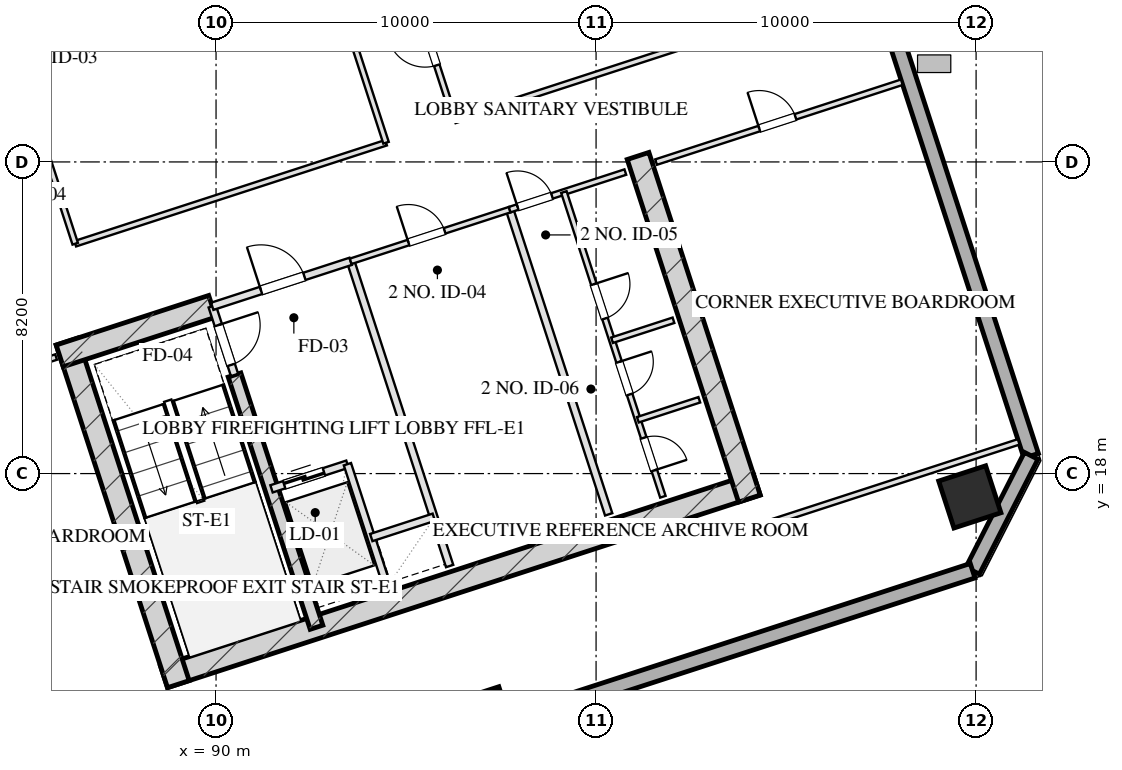
"""IFC4 building model, lengths in metres.
Left out: names, types, materials, properties, quantities, classifications, styles, units other than length and angle.
Written with IfcOpenShell. Run it as: python <this file> out.ifc"""

import sys

from ifc_helpers import new_model, si_unit, direction, frame, frame_2d, origin, origin_2d, place, context, subcontext, project, spatial, rectangle, hollow_rectangle, extrude, element, fill, save


model = new_model("IFC4")
c1 = context("Model", 3, precision=1e-05, world=origin(), true_north=direction((0.0, 1.0)))
c2 = subcontext(c1, "Body", "Model", "MODEL_VIEW")
j1 = project(units=[si_unit("LENGTHUNIT", "METRE"), si_unit("PLANEANGLEUNIT", "RADIAN")], contexts=[c1])
p1 = place(None, origin())
s1 = spatial("IfcSite", under=j1, at=p1, CompositionType="ELEMENT")
p2 = place(p1, origin())
s2 = spatial("IfcBuilding", under=s1, at=p2, CompositionType="ELEMENT")
p3 = place(p2, frame((0.0, 0.0, 163.3)))
s3 = spatial("IfcBuildingStorey", under=s2, at=p3, CompositionType="ELEMENT", Elevation=163.3)
p4 = place(p3, frame((88.63, 12.652, 0.0), z_axis=(0.0, 0.0, 1.0), x_axis=(0.95105714907, 0.309015046886, 0.0)))
e1 = element("IfcWall", 1, at=p4, inside=s3, PredefinedType="SHEAR", context=c2, shape_type="SweptSolid", body=[
    extrude(rectangle(XDim=16.4, YDim=0.6, at=frame_2d((8.2, 0.0))), origin(), (0.0, 0.0, 1.0), 3.45),
])
p5 = place(p3, frame((86.078, 21.475, 0.0), z_axis=(0.0, 0.0, 1.0), x_axis=(0.309017938678, -0.951056209472, 0.0)))
e2 = element("IfcWall", 2, at=p5, inside=s3, PredefinedType="SHEAR", context=c2, shape_type="SweptSolid", body=[
    extrude(rectangle(XDim=9.48, YDim=0.6, at=frame_2d((4.74, 0.0))), origin(), (0.0, 0.0, 1.0), 3.45),
])
p6 = place(p3, frame((101.105, 26.358, 0.0), z_axis=(0.0, 0.0, 1.0), x_axis=(0.309010370028, -0.95105866865, 0.0)))
e3 = element("IfcWall", 3, at=p6, inside=s3, PredefinedType="SHEAR", context=c2, shape_type="SweptSolid", body=[
    extrude(rectangle(XDim=9.48, YDim=0.6, at=frame_2d((4.74, 0.0))), origin(), (0.0, 0.0, 1.0), 3.45),
])
p7 = place(p3, frame((90.486, 20.594, 0.0), z_axis=(0.0, 0.0, 1.0), x_axis=(0.309020428229, -0.951055400562, 0.0)))
e4 = element("IfcWall", 4, at=p7, inside=s3, PredefinedType="SHEAR", context=c2, shape_type="SweptSolid", body=[
    extrude(rectangle(XDim=6.98, YDim=0.35, at=frame_2d((3.49, 0.0))), origin(), (0.0, 0.0, 1.0), 3.45),
])
p8 = place(p3, frame((85.886, 21.097, 0.0), z_axis=(0.0, 0.0, 1.0), x_axis=(0.951068073652, 0.308981422225, 0.0)))
e5 = element("IfcWall", 5, at=p8, inside=s3, PredefinedType="SHEAR", context=c2, shape_type="SweptSolid", body=[
    extrude(rectangle(XDim=4.22, YDim=0.6, at=frame_2d((2.11, 0.0))), origin(), (0.0, 0.0, 1.0), 3.45),
])
p9 = place(p3, frame((109.835, 17.386, 0.0), z_axis=(0.0, 0.0, 1.0), x_axis=(0.951056516295, 0.309016994375, 0.0)))
e6 = element("IfcColumn", 6, at=p9, inside=s3, PredefinedType="COLUMN", context=c2, shape_type="SweptSolid", body=[
    extrude(hollow_rectangle(XDim=1.3, YDim=1.3, WallThickness=0.045, at=origin_2d()), origin(), (0.0, 0.0, 1.0), 3.451),
])
p10 = place(p3, frame((97.185, 11.888, 0.0), z_axis=(0.0, 0.0, 1.0), x_axis=(0.951056516295, 0.309016994375, 0.0)))
e7 = element("IfcColumn", 7, at=p10, inside=s3, PredefinedType="COLUMN", context=c2, shape_type="SweptSolid", body=[
    extrude(hollow_rectangle(XDim=0.8, YDim=0.8, WallThickness=0.028, at=origin_2d()), origin(), (0.0, 0.0, 1.0), 3.451),
])
p11 = place(p3, frame((98.224, 59.173, 0.0), z_axis=(0.0, 0.0, 1.0), x_axis=(0.309014228706, -0.951057414911, 0.0)))
e8 = element("IfcWall", 8, at=p11, inside=s3, PredefinedType="SOLIDWALL", context=c2, shape_type="SweptSolid", body=[
    extrude(rectangle(XDim=42.8, YDim=0.4, at=frame_2d((21.4, 0.0))), origin(), (0.0, 0.0, 1.0), 2.61),
])
p12 = place(p11, frame((26.675, 0.0, 0.75)))
e9 = element("IfcOpeningElement", 9, at=p12, cuts=e8, PredefinedType="OPENING", context=c2, shape_type="SweptSolid", body=[
    extrude(rectangle(XDim=2.25, YDim=1.46, at=frame_2d((1.125, 0.73))), frame((0.0, 0.21, 0.0), z_axis=(0.0, -1.0, 0.0), x_axis=(1.0, 0.0, 0.0)), (0.0, 0.0, 1.0), 0.42),
])
p13 = place(p11, frame((22.875, 0.0, 0.75)))
e10 = element("IfcOpeningElement", 10, at=p13, cuts=e8, PredefinedType="OPENING", context=c2, shape_type="SweptSolid", body=[
    extrude(rectangle(XDim=2.25, YDim=1.46, at=frame_2d((1.125, 0.73))), frame((0.0, 0.21, 0.0), z_axis=(0.0, -1.0, 0.0), x_axis=(1.0, 0.0, 0.0)), (0.0, 0.0, 1.0), 0.42),
])
p14 = place(p11, frame((17.892, 0.0, 0.0)))
e11 = element("IfcOpeningElement", 11, at=p14, cuts=e8, PredefinedType="OPENING", context=c2, shape_type="SweptSolid", body=[
    extrude(rectangle(XDim=1.1, YDim=2.15, at=frame_2d((0.55, 1.075))), frame((0.0, 0.21, 0.0), z_axis=(0.0, -1.0, 0.0), x_axis=(1.0, 0.0, 0.0)), (0.0, 0.0, 1.0), 0.42),
])
p15 = place(p3, frame((111.449, 18.468, 0.0), z_axis=(0.0, 0.0, 1.0), x_axis=(-0.454019523198, -0.890991735402, 0.0)))
e12 = element("IfcWall", 12, at=p15, inside=s3, PredefinedType="SOLIDWALL", context=c2, shape_type="SweptSolid", body=[
    extrude(rectangle(XDim=3.394, YDim=0.4, at=frame_2d((1.697, 0.0))), origin(), (0.0, 0.0, 1.0), 2.61),
])
p16 = place(p3, frame((109.908, 15.444, 0.0), z_axis=(0.0, 0.0, 1.0), x_axis=(-0.951057580055, -0.30901372044, 0.0)))
e13 = element("IfcWall", 13, at=p16, inside=s3, PredefinedType="SOLIDWALL", context=c2, shape_type="SweptSolid", body=[
    extrude(rectangle(XDim=26.4, YDim=0.4, at=frame_2d((13.2, 0.0))), origin(), (0.0, 0.0, 1.0), 2.61),
])
p17 = place(p3, frame((89.899, 22.401, 0.0), z_axis=(0.0, 0.0, 1.0), x_axis=(0.308932062672, -0.951084108086, 0.0)))
e14 = element("IfcWall", 14, at=p17, inside=s3, PredefinedType="PARTITIONING", context=c2, shape_type="SweptSolid", body=[
    extrude(rectangle(XDim=1.9, YDim=0.2, at=frame_2d((0.95, 0.0))), origin(), (0.0, 0.0, 1.0), 3.175),
])
p18 = place(p17, frame((0.52, 0.0, 0.0)))
e15 = element("IfcOpeningElement", 15, at=p18, cuts=e14, PredefinedType="OPENING", context=c2, shape_type="SweptSolid", body=[
    extrude(rectangle(XDim=1.1, YDim=2.05, at=frame_2d((0.55, 1.025))), frame((0.0, 0.11, 0.0), z_axis=(0.0, -1.0, 0.0), x_axis=(1.0, 0.0, 0.0)), (0.0, 0.0, 1.0), 0.22),
])
p19 = place(p3, frame((93.542, 23.585, 0.0), z_axis=(0.0, 0.0, 1.0), x_axis=(0.309042196757, -0.951048327176, 0.0)))
e16 = element("IfcWall", 16, at=p19, inside=s3, PredefinedType="PARTITIONING", context=c2, shape_type="SweptSolid", body=[
    extrude(rectangle(XDim=8.43, YDim=0.2, at=frame_2d((4.215, 0.0))), origin(), (0.0, 0.0, 1.0), 3.175),
])
p20 = place(p3, frame((89.899, 22.401, 0.0), z_axis=(0.0, 0.0, 1.0), x_axis=(0.951046716504, 0.309047153403, 0.0)))
e17 = element("IfcWall", 17, at=p20, inside=s3, PredefinedType="PARTITIONING", context=c2, shape_type="SweptSolid", body=[
    extrude(rectangle(XDim=3.83, YDim=0.2, at=frame_2d((1.915, 0.0))), origin(), (0.0, 0.0, 1.0), 3.175),
])
p21 = place(p20, frame((1.35, 0.0, 0.0)))
e18 = element("IfcOpeningElement", 18, at=p21, cuts=e17, PredefinedType="OPENING", context=c2, shape_type="SweptSolid", body=[
    extrude(rectangle(XDim=1.2, YDim=2.05, at=frame_2d((0.6, 1.025))), frame((0.0, 0.11, 0.0), z_axis=(0.0, -1.0, 0.0), x_axis=(1.0, 0.0, 0.0)), (0.0, 0.0, 1.0), 0.22),
])
p22 = place(p3, frame((91.46, 17.598, 0.0), z_axis=(0.0, 0.0, 1.0), x_axis=(0.951062257173, 0.308999325213, 0.0)))
e19 = element("IfcWall", 19, at=p22, inside=s3, PredefinedType="PARTITIONING", context=c2, shape_type="SweptSolid", body=[
    extrude(rectangle(XDim=2.1, YDim=0.2, at=frame_2d((1.05, 0.0))), origin(), (0.0, 0.0, 1.0), 3.175),
])
p23 = place(p22, frame((0.35, 0.0, 0.0)))
e20 = element("IfcOpeningElement", 20, at=p23, cuts=e19, PredefinedType="OPENING", context=c2, shape_type="SweptSolid", body=[
    extrude(rectangle(XDim=1.1, YDim=2.05, at=frame_2d((0.55, 1.025))), frame((0.0, 0.11, 0.0), z_axis=(0.0, -1.0, 0.0), x_axis=(1.0, 0.0, 0.0)), (0.0, 0.0, 1.0), 0.22),
])
p24 = place(p3, frame((93.457, 18.247, 0.0), z_axis=(0.0, 0.0, 1.0), x_axis=(0.3089935693, -0.951064127245, 0.0)))
e21 = element("IfcWall", 21, at=p24, inside=s3, PredefinedType="PARTITIONING", context=c2, shape_type="SweptSolid", body=[
    extrude(rectangle(XDim=3.7, YDim=0.2, at=frame_2d((1.85, 0.0))), origin(), (0.0, 0.0, 1.0), 3.175),
])
p25 = place(p3, frame((94.084, 16.317, 0.0), z_axis=(0.0, 0.0, 1.0), x_axis=(0.951041328149, 0.309063734775, 0.0)))
e22 = element("IfcWall", 22, at=p25, inside=s3, PredefinedType="PARTITIONING", context=c2, shape_type="SweptSolid", body=[
    extrude(rectangle(XDim=1.73, YDim=0.2, at=frame_2d((0.865, 0.0))), origin(), (0.0, 0.0, 1.0), 3.175),
])
p26 = place(p3, frame((97.727, 24.944, 0.0), z_axis=(0.0, 0.0, 1.0), x_axis=(0.309016001439, -0.951056838919, 0.0)))
e23 = element("IfcWall", 23, at=p26, inside=s3, PredefinedType="PARTITIONING", context=c2, shape_type="SweptSolid", body=[
    extrude(rectangle(XDim=8.43, YDim=0.2, at=frame_2d((4.215, 0.0))), origin(), (0.0, 0.0, 1.0), 3.175),
])
p27 = place(p3, frame((93.542, 23.585, 0.0), z_axis=(0.0, 0.0, 1.0), x_axis=(0.951063829732, 0.308994485023, 0.0)))
e24 = element("IfcWall", 24, at=p27, inside=s3, PredefinedType="PARTITIONING", context=c2, shape_type="SweptSolid", body=[
    extrude(rectangle(XDim=4.4, YDim=0.15, at=frame_2d((2.2, 0.0))), origin(), (0.0, 0.0, 1.0), 3.175),
])
p28 = place(p27, frame((1.6, 0.0, 0.0)))
e25 = element("IfcOpeningElement", 25, at=p28, cuts=e24, PredefinedType="OPENING", context=c2, shape_type="SweptSolid", body=[
    extrude(rectangle(XDim=1.0, YDim=2.05, at=frame_2d((0.5, 1.025))), frame((0.0, 0.085, 0.0), z_axis=(0.0, -1.0, 0.0), x_axis=(1.0, 0.0, 0.0)), (0.0, 0.0, 1.0), 0.17),
])
p29 = place(p3, frame((97.727, 24.944, 0.0), z_axis=(0.0, 0.0, 1.0), x_axis=(0.951036872128, 0.309077446369, 0.0)))
e26 = element("IfcWall", 26, at=p29, inside=s3, PredefinedType="PARTITIONING", context=c2, shape_type="SweptSolid", body=[
    extrude(rectangle(XDim=3.2, YDim=0.15, at=frame_2d((1.6, 0.0))), origin(), (0.0, 0.0, 1.0), 3.175),
])
p30 = place(p29, frame((0.22, 0.0, 0.0)))
e27 = element("IfcOpeningElement", 27, at=p30, cuts=e26, PredefinedType="OPENING", context=c2, shape_type="SweptSolid", body=[
    extrude(rectangle(XDim=0.95, YDim=2.05, at=frame_2d((0.475, 1.025))), frame((0.0, 0.085, 0.0), z_axis=(0.0, -1.0, 0.0), x_axis=(1.0, 0.0, 0.0)), (0.0, 0.0, 1.0), 0.17),
])
p31 = place(p3, frame((99.153, 25.408, 0.0), z_axis=(0.0, 0.0, 1.0), x_axis=(0.309016001439, -0.951056838919, 0.0)))
e28 = element("IfcWall", 28, at=p31, inside=s3, PredefinedType="PARTITIONING", context=c2, shape_type="SweptSolid", body=[
    extrude(rectangle(XDim=8.43, YDim=0.15, at=frame_2d((4.215, 0.0))), origin(), (0.0, 0.0, 1.0), 3.175),
])
p32 = place(p31, frame((2.55, 0.0, 0.0)))
e29 = element("IfcOpeningElement", 29, at=p32, cuts=e28, PredefinedType="OPENING", context=c2, shape_type="SweptSolid", body=[
    extrude(rectangle(XDim=0.95, YDim=2.05, at=frame_2d((0.475, 1.025))), frame((0.0, 0.085, 0.0), z_axis=(0.0, -1.0, 0.0), x_axis=(1.0, 0.0, 0.0)), (0.0, 0.0, 1.0), 0.17),
])
p33 = place(p31, frame((4.7, 0.0, 0.0)))
e30 = element("IfcOpeningElement", 30, at=p33, cuts=e28, PredefinedType="OPENING", context=c2, shape_type="SweptSolid", body=[
    extrude(rectangle(XDim=0.9, YDim=2.05, at=frame_2d((0.45, 1.025))), frame((0.0, 0.085, 0.0), z_axis=(0.0, -1.0, 0.0), x_axis=(1.0, 0.0, 0.0)), (0.0, 0.0, 1.0), 0.17),
])
p34 = place(p31, frame((6.8, 0.0, 0.0)))
e31 = element("IfcOpeningElement", 31, at=p34, cuts=e28, PredefinedType="OPENING", context=c2, shape_type="SweptSolid", body=[
    extrude(rectangle(XDim=0.9, YDim=2.05, at=frame_2d((0.45, 1.025))), frame((0.0, 0.085, 0.0), z_axis=(0.0, -1.0, 0.0), x_axis=(1.0, 0.0, 0.0)), (0.0, 0.0, 1.0), 0.17),
])
p35 = place(p3, frame((100.42, 21.509, 0.0), z_axis=(0.0, 0.0, 1.0), x_axis=(0.951040401051, 0.309066587596, 0.0)))
e32 = element("IfcWall", 32, at=p35, inside=s3, PredefinedType="PARTITIONING", context=c2, shape_type="SweptSolid", body=[
    extrude(rectangle(XDim=1.7, YDim=0.15, at=frame_2d((0.85, 0.0))), origin(), (0.0, 0.0, 1.0), 3.175),
])
p36 = place(p3, frame((101.1, 19.416, 0.0), z_axis=(0.0, 0.0, 1.0), x_axis=(0.951054116971, 0.309024378638, 0.0)))
e33 = element("IfcWall", 33, at=p36, inside=s3, PredefinedType="PARTITIONING", context=c2, shape_type="SweptSolid", body=[
    extrude(rectangle(XDim=1.7, YDim=0.15, at=frame_2d((0.85, 0.0))), origin(), (0.0, 0.0, 1.0), 3.175),
])
p37 = place(p3, frame((78.753, 18.78, 0.0), z_axis=(0.0, 0.0, 1.0), x_axis=(0.951060977215, 0.309003264738, 0.0)))
e34 = element("IfcWall", 34, at=p37, inside=s3, PredefinedType="PARTITIONING", context=c2, shape_type="SweptSolid", body=[
    extrude(rectangle(XDim=7.4, YDim=0.15, at=frame_2d((3.7, 0.0))), origin(), (0.0, 0.0, 1.0), 3.175),
])
p38 = place(p37, frame((3.108, 0.0, 0.0)))
e35 = element("IfcOpeningElement", 35, at=p38, cuts=e34, PredefinedType="OPENING", context=c2, shape_type="SweptSolid", body=[
    extrude(rectangle(XDim=1.05, YDim=2.05, at=frame_2d((0.525, 1.025))), frame((0.0, 0.085, 0.0), z_axis=(0.0, -1.0, 0.0), x_axis=(1.0, 0.0, 0.0)), (0.0, 0.0, 1.0), 0.17),
])
p39 = place(p3, frame((104.653, 16.733, 0.0), z_axis=(0.0, 0.0, 1.0), x_axis=(0.951054383043, 0.309023559774, 0.0)))
e36 = element("IfcWall", 36, at=p39, inside=s3, PredefinedType="PARTITIONING", context=c2, shape_type="SweptSolid", body=[
    extrude(rectangle(XDim=6.8, YDim=0.15, at=frame_2d((3.4, 0.0))), origin(), (0.0, 0.0, 1.0), 3.175),
])
p40 = place(p3, frame((101.578, 26.196, 0.0), z_axis=(0.0, 0.0, 1.0), x_axis=(0.951064934653, 0.308991084134, 0.0)))
e37 = element("IfcWall", 37, at=p40, inside=s3, PredefinedType="PARTITIONING", context=c2, shape_type="SweptSolid", body=[
    extrude(rectangle(XDim=6.8, YDim=0.15, at=frame_2d((3.4, 0.0))), origin(), (0.0, 0.0, 1.0), 3.175),
])
p41 = place(p40, frame((2.856, 0.0, 0.0)))
e38 = element("IfcOpeningElement", 38, at=p41, cuts=e37, PredefinedType="OPENING", context=c2, shape_type="SweptSolid", body=[
    extrude(rectangle(XDim=1.0, YDim=2.05, at=frame_2d((0.5, 1.025))), frame((0.0, 0.085, 0.0), z_axis=(0.0, -1.0, 0.0), x_axis=(1.0, 0.0, 0.0)), (0.0, 0.0, 1.0), 0.17),
])
p42 = place(p3, frame((86.294, 24.048, 0.0), z_axis=(0.0, 0.0, 1.0), x_axis=(0.951052008164, 0.309030868631, 0.0)))
e39 = element("IfcWall", 39, at=p42, inside=s3, PredefinedType="PARTITIONING", context=c2, shape_type="SweptSolid", body=[
    extrude(rectangle(XDim=8.6, YDim=0.15, at=frame_2d((4.3, 0.0))), origin(), (0.0, 0.0, 1.0), 3.175),
])
p43 = place(p3, frame((96.28, 27.292, 0.0), z_axis=(0.0, 0.0, 1.0), x_axis=(0.951056999652, 0.309015506751, 0.0)))
e40 = element("IfcWall", 40, at=p43, inside=s3, PredefinedType="PARTITIONING", context=c2, shape_type="SweptSolid", body=[
    extrude(rectangle(XDim=11.5, YDim=0.15, at=frame_2d((5.75, 0.0))), origin(), (0.0, 0.0, 1.0), 3.175),
])
p44 = place(p3, frame((86.294, 24.048, 0.0), z_axis=(0.0, 0.0, 1.0), x_axis=(-0.309004459387, 0.951060589068, 0.0)))
e41 = element("IfcWall", 41, at=p44, inside=s3, PredefinedType="PARTITIONING", context=c2, shape_type="SweptSolid", body=[
    extrude(rectangle(XDim=16.64, YDim=0.15, at=frame_2d((8.32, 0.0))), origin(), (0.0, 0.0, 1.0), 3.175),
])
p45 = place(p44, frame((4.284, 0.0, 0.0)))
e42 = element("IfcOpeningElement", 42, at=p45, cuts=e41, PredefinedType="OPENING", context=c2, shape_type="SweptSolid", body=[
    extrude(rectangle(XDim=1.1, YDim=2.05, at=frame_2d((0.55, 1.025))), frame((0.0, 0.085, 0.0), z_axis=(0.0, -1.0, 0.0), x_axis=(1.0, 0.0, 0.0)), (0.0, 0.0, 1.0), 0.17),
])
p46 = place(p44, frame((12.724, 0.0, 0.0)))
e43 = element("IfcOpeningElement", 43, at=p46, cuts=e41, PredefinedType="OPENING", context=c2, shape_type="SweptSolid", body=[
    extrude(rectangle(XDim=1.1, YDim=2.05, at=frame_2d((0.55, 1.025))), frame((0.0, 0.085, 0.0), z_axis=(0.0, -1.0, 0.0), x_axis=(1.0, 0.0, 0.0)), (0.0, 0.0, 1.0), 0.17),
])
p47 = place(p3, frame((94.473, 26.705, 0.0), z_axis=(0.0, 0.0, 1.0), x_axis=(-0.309022042254, 0.951054876125, 0.0)))
e44 = element("IfcWall", 44, at=p47, inside=s3, PredefinedType="PARTITIONING", context=c2, shape_type="SweptSolid", body=[
    extrude(rectangle(XDim=16.64, YDim=0.15, at=frame_2d((8.32, 0.0))), origin(), (0.0, 0.0, 1.0), 3.175),
])
p48 = place(p3, frame((96.28, 27.292, 0.0), z_axis=(0.0, 0.0, 1.0), x_axis=(-0.309008771245, 0.951059188113, 0.0)))
e45 = element("IfcWall", 45, at=p48, inside=s3, PredefinedType="PARTITIONING", context=c2, shape_type="SweptSolid", body=[
    extrude(rectangle(XDim=16.64, YDim=0.15, at=frame_2d((8.32, 0.0))), origin(), (0.0, 0.0, 1.0), 3.175),
])
p49 = place(p48, frame((1.526, 0.0, 0.0)))
e46 = element("IfcOpeningElement", 46, at=p49, cuts=e45, PredefinedType="OPENING", context=c2, shape_type="SweptSolid", body=[
    extrude(rectangle(XDim=1.0, YDim=2.05, at=frame_2d((0.5, 1.025))), frame((0.0, 0.085, 0.0), z_axis=(0.0, -1.0, 0.0), x_axis=(1.0, 0.0, 0.0)), (0.0, 0.0, 1.0), 0.17),
])
p50 = place(p48, frame((6.026, 0.0, 0.0)))
e47 = element("IfcOpeningElement", 47, at=p50, cuts=e45, PredefinedType="OPENING", context=c2, shape_type="SweptSolid", body=[
    extrude(rectangle(XDim=1.0, YDim=2.05, at=frame_2d((0.5, 1.025))), frame((0.0, 0.085, 0.0), z_axis=(0.0, -1.0, 0.0), x_axis=(1.0, 0.0, 0.0)), (0.0, 0.0, 1.0), 0.17),
])
p51 = place(p48, frame((10.519, 0.0, 0.0)))
e48 = element("IfcOpeningElement", 48, at=p51, cuts=e45, PredefinedType="OPENING", context=c2, shape_type="SweptSolid", body=[
    extrude(rectangle(XDim=0.85, YDim=2.05, at=frame_2d((0.425, 1.025))), frame((0.0, 0.085, 0.0), z_axis=(0.0, -1.0, 0.0), x_axis=(1.0, 0.0, 0.0)), (0.0, 0.0, 1.0), 0.17),
])
p52 = place(p48, frame((14.338, 0.0, 0.0)))
e49 = element("IfcOpeningElement", 49, at=p52, cuts=e45, PredefinedType="OPENING", context=c2, shape_type="SweptSolid", body=[
    extrude(rectangle(XDim=1.05, YDim=2.05, at=frame_2d((0.525, 1.025))), frame((0.0, 0.085, 0.0), z_axis=(0.0, -1.0, 0.0), x_axis=(1.0, 0.0, 0.0)), (0.0, 0.0, 1.0), 0.17),
])
p53 = place(p18, origin())
e50 = element("IfcDoor", 50, at=p53, inside=s3, OperationType="SINGLE_SWING_LEFT", PredefinedType="DOOR", context=c2, shape_type="SweptSolid", body=[
    extrude(rectangle(XDim=1.1, YDim=2.05, at=frame_2d((0.55, 1.025))), frame((0.0, 0.025, 0.0), z_axis=(0.0, -1.0, 0.0), x_axis=(1.0, 0.0, 0.0)), (0.0, 0.0, 1.0), 0.05),
])
fill(e15, e50)
p54 = place(p21, origin())
e51 = element("IfcDoor", 51, at=p54, inside=s3, OperationType="SINGLE_SWING_LEFT", PredefinedType="DOOR", context=c2, shape_type="SweptSolid", body=[
    extrude(rectangle(XDim=1.2, YDim=2.05, at=frame_2d((0.6, 1.025))), frame((0.0, 0.025, 0.0), z_axis=(0.0, -1.0, 0.0), x_axis=(1.0, 0.0, 0.0)), (0.0, 0.0, 1.0), 0.05),
])
fill(e18, e51)
p55 = place(p23, origin())
e52 = element("IfcDoor", 52, at=p55, inside=s3, OperationType="DOUBLE_DOOR_SLIDING", PredefinedType="DOOR", context=c2, shape_type="SweptSolid", body=[
    extrude(rectangle(XDim=1.1, YDim=2.05, at=frame_2d((0.55, 1.025))), frame((0.0, 0.025, 0.0), z_axis=(0.0, -1.0, 0.0), x_axis=(1.0, 0.0, 0.0)), (0.0, 0.0, 1.0), 0.05),
])
fill(e20, e52)
p56 = place(p28, origin())
e53 = element("IfcDoor", 53, at=p56, inside=s3, OperationType="SINGLE_SWING_LEFT", PredefinedType="DOOR", context=c2, shape_type="SweptSolid", body=[
    extrude(rectangle(XDim=1.0, YDim=2.05, at=frame_2d((0.5, 1.025))), frame((0.0, 0.025, 0.0), z_axis=(0.0, -1.0, 0.0), x_axis=(1.0, 0.0, 0.0)), (0.0, 0.0, 1.0), 0.05),
])
fill(e25, e53)
p57 = place(p30, origin())
e54 = element("IfcDoor", 54, at=p57, inside=s3, OperationType="SINGLE_SWING_LEFT", PredefinedType="DOOR", context=c2, shape_type="SweptSolid", body=[
    extrude(rectangle(XDim=0.95, YDim=2.05, at=frame_2d((0.475, 1.025))), frame((0.0, 0.025, 0.0), z_axis=(0.0, -1.0, 0.0), x_axis=(1.0, 0.0, 0.0)), (0.0, 0.0, 1.0), 0.05),
])
fill(e27, e54)
p58 = place(p32, origin())
e55 = element("IfcDoor", 55, at=p58, inside=s3, OperationType="SINGLE_SWING_LEFT", PredefinedType="DOOR", context=c2, shape_type="SweptSolid", body=[
    extrude(rectangle(XDim=0.95, YDim=2.05, at=frame_2d((0.475, 1.025))), frame((0.0, 0.025, 0.0), z_axis=(0.0, -1.0, 0.0), x_axis=(1.0, 0.0, 0.0)), (0.0, 0.0, 1.0), 0.05),
])
fill(e29, e55)
p59 = place(p33, origin())
e56 = element("IfcDoor", 56, at=p59, inside=s3, OperationType="SINGLE_SWING_LEFT", PredefinedType="DOOR", context=c2, shape_type="SweptSolid", body=[
    extrude(rectangle(XDim=0.9, YDim=2.05, at=frame_2d((0.45, 1.025))), frame((0.0, 0.025, 0.0), z_axis=(0.0, -1.0, 0.0), x_axis=(1.0, 0.0, 0.0)), (0.0, 0.0, 1.0), 0.05),
])
fill(e30, e56)
p60 = place(p34, origin())
e57 = element("IfcDoor", 57, at=p60, inside=s3, OperationType="SINGLE_SWING_RIGHT", PredefinedType="DOOR", context=c2, shape_type="SweptSolid", body=[
    extrude(rectangle(XDim=0.9, YDim=2.05, at=frame_2d((0.45, 1.025))), frame((0.0, 0.025, 0.0), z_axis=(0.0, -1.0, 0.0), x_axis=(1.0, 0.0, 0.0)), (0.0, 0.0, 1.0), 0.05),
])
fill(e31, e57)
p61 = place(p41, origin())
e58 = element("IfcDoor", 58, at=p61, inside=s3, OperationType="SINGLE_SWING_LEFT", PredefinedType="DOOR", context=c2, shape_type="SweptSolid", body=[
    extrude(rectangle(XDim=1.0, YDim=2.05, at=frame_2d((0.5, 1.025))), frame((0.0, 0.025, 0.0), z_axis=(0.0, -1.0, 0.0), x_axis=(1.0, 0.0, 0.0)), (0.0, 0.0, 1.0), 0.05),
])
fill(e38, e58)
p62 = place(p49, origin())
e59 = element("IfcDoor", 59, at=p62, inside=s3, OperationType="SINGLE_SWING_RIGHT", PredefinedType="DOOR", context=c2, shape_type="SweptSolid", body=[
    extrude(rectangle(XDim=1.0, YDim=2.05, at=frame_2d((0.5, 1.025))), frame((0.0, 0.025, 0.0), z_axis=(0.0, -1.0, 0.0), x_axis=(1.0, 0.0, 0.0)), (0.0, 0.0, 1.0), 0.05),
])
fill(e46, e59)
save(model, sys.argv[1])
